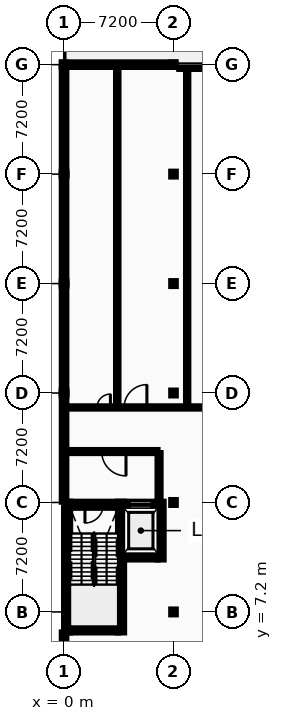
"""IFC4 building model, lengths in metres.
Left out: names, types, materials, properties, quantities, classifications, styles, units other than length and angle.
Written with IfcOpenShell. Run it as: python <this file> out.ifc"""

import sys

from ifc_helpers import new_model, si_unit, direction, frame, frame_2d, origin, origin_2d, place, context, subcontext, project, spatial, rectangle, i_section, extrude, element, fill, save


model = new_model("IFC4")
c1 = context("Model", 3, precision=1e-05, world=origin(), true_north=direction((0.0, 1.0)))
c2 = subcontext(c1, "Body", "Model", "MODEL_VIEW")
j1 = project(units=[si_unit("LENGTHUNIT", "METRE"), si_unit("PLANEANGLEUNIT", "RADIAN")], contexts=[c1])
p1 = place(None, origin())
s1 = spatial("IfcSite", under=j1, at=p1, CompositionType="ELEMENT")
p2 = place(p1, origin())
s2 = spatial("IfcBuilding", under=s1, at=p2, CompositionType="ELEMENT")
p3 = place(p2, frame((0.0, 0.0, 22.8)))
s3 = spatial("IfcBuildingStorey", under=s2, at=p3, CompositionType="ELEMENT", Elevation=22.8)
for number, where, z_axis, x_axis in (
    (1, (0.0, 21.6, 0.0), (0.0, 0.0, 1.0), (1.0, 0.0, 0.0)),
    (2, (0.0, 28.8, 0.0), (0.0, 0.0, 1.0), (1.0, 0.0, 0.0)),
    (3, (0.0, 36.0, 0.0), (0.0, 0.0, 1.0), (1.0, 0.0, 0.0)),
):
    element("IfcColumn", number, at=place(p3, frame(where, z_axis=z_axis, x_axis=x_axis)), inside=s3, PredefinedType="COLUMN", context=c2, shape_type="SweptSolid", body=[
        extrude(i_section(OverallWidth=0.3, OverallDepth=0.32, WebThickness=0.011, FlangeThickness=0.021, FilletRadius=0.027, at=origin_2d()), origin(), (0.0, 0.0, 1.0), 4.4),
    ])
p4 = place(p3, frame((0.0, 43.2, 0.0), z_axis=(0.0, 0.0, 1.0), x_axis=(1.0, 0.0, 0.0)))
e4 = element("IfcColumn", 4, at=p4, inside=s3, PredefinedType="COLUMN", context=c2, shape_type="SweptSolid", body=[
    extrude(i_section(OverallWidth=0.28, OverallDepth=0.28, WebThickness=0.01, FlangeThickness=0.018, FilletRadius=0.024, at=origin_2d()), origin(), (0.0, 0.0, 1.0), 4.4),
])
for number, where, z_axis, x_axis in (
    (5, (7.2, 7.2, 0.0), (0.0, 0.0, 1.0), (1.0, 0.0, 0.0)),
    (6, (7.2, 14.4, 0.0), (0.0, 0.0, 1.0), (1.0, 0.0, 0.0)),
    (7, (7.2, 21.6, 0.0), (0.0, 0.0, 1.0), (1.0, 0.0, 0.0)),
    (8, (7.2, 28.8, 0.0), (0.0, 0.0, 1.0), (1.0, 0.0, 0.0)),
    (9, (7.2, 36.0, 0.0), (0.0, 0.0, 1.0), (1.0, 0.0, 0.0)),
):
    element("IfcColumn", number, at=place(p3, frame(where, z_axis=z_axis, x_axis=x_axis)), inside=s3, PredefinedType="COLUMN", context=c2, shape_type="SweptSolid", body=[
        extrude(i_section(OverallWidth=0.3, OverallDepth=0.32, WebThickness=0.011, FlangeThickness=0.021, FilletRadius=0.027, at=origin_2d()), origin(), (0.0, 0.0, 1.0), 4.4),
    ])
p5 = place(p3, frame((7.2, 43.2, 0.0), z_axis=(0.0, 0.0, 1.0), x_axis=(1.0, 0.0, 0.0)))
e10 = element("IfcColumn", 10, at=p5, inside=s3, PredefinedType="COLUMN", context=c2, shape_type="SweptSolid", body=[
    extrude(i_section(OverallWidth=0.28, OverallDepth=0.28, WebThickness=0.01, FlangeThickness=0.018, FilletRadius=0.024, at=origin_2d()), origin(), (0.0, 0.0, 1.0), 4.4),
])
p6 = place(p3, frame((7.31, 43.2, 0.0), z_axis=(0.0, 0.0, 1.0), x_axis=(-1.0, 0.0, 0.0)))
e11 = element("IfcWall", 11, at=p6, inside=s3, PredefinedType="STANDARD", context=c2, shape_type="SweptSolid", body=[
    extrude(rectangle(XDim=7.46, YDim=0.3, at=frame_2d((3.73, 0.0))), origin(), (0.0, 0.0, 1.0), 3.915),
])
p7 = place(p3, frame((0.0, 5.85, 0.0), z_axis=(0.0, 0.0, 1.0), x_axis=(0.0, -1.0, 0.0)))
e12 = element("IfcWall", 12, at=p7, inside=s3, PredefinedType="STANDARD", context=c2, shape_type="SweptSolid", body=[
    extrude(rectangle(XDim=5.7, YDim=0.3, at=frame_2d((2.85, 0.0))), origin(), (0.0, 0.0, 1.0), 4.215),
])
p8 = place(p7, frame((1.95, 0.0, 0.9)))
e13 = element("IfcOpeningElement", 13, at=p8, cuts=e12, PredefinedType="OPENING", context=c2, shape_type="SweptSolid", body=[
    extrude(rectangle(XDim=1.8, YDim=1.8, at=frame_2d((0.9, 0.9))), frame((0.0, 0.16, 0.0), z_axis=(0.0, -1.0, 0.0), x_axis=(1.0, 0.0, 0.0)), (0.0, 0.0, 1.0), 0.32),
])
p9 = place(p3, frame((0.0, 21.6, 0.0), z_axis=(0.0, 0.0, 1.0), x_axis=(0.0, -1.0, 0.0)))
e14 = element("IfcWall", 14, at=p9, inside=s3, PredefinedType="STANDARD", context=c2, shape_type="SweptSolid", body=[
    extrude(rectangle(XDim=7.15, YDim=0.3, at=frame_2d((3.575, 0.0))), origin(), (0.0, 0.0, 1.0), 4.215),
])
p10 = place(p3, frame((0.0, 28.8, 0.0), z_axis=(0.0, 0.0, 1.0), x_axis=(0.0, -1.0, 0.0)))
e15 = element("IfcWall", 15, at=p10, inside=s3, PredefinedType="STANDARD", context=c2, shape_type="SweptSolid", body=[
    extrude(rectangle(XDim=7.2, YDim=0.3, at=frame_2d((3.6, 0.0))), origin(), (0.0, 0.0, 1.0), 3.9),
])
p11 = place(p10, frame((1.56, 0.0, 0.9)))
e16 = element("IfcOpeningElement", 16, at=p11, cuts=e15, PredefinedType="OPENING", context=c2, shape_type="SweptSolid", body=[
    extrude(rectangle(XDim=1.2, YDim=1.8, at=frame_2d((0.6, 0.9))), frame((0.0, 0.16, 0.0), z_axis=(0.0, -1.0, 0.0), x_axis=(1.0, 0.0, 0.0)), (0.0, 0.0, 1.0), 0.32),
])
p12 = place(p10, frame((4.44, 0.0, 0.9)))
e17 = element("IfcOpeningElement", 17, at=p12, cuts=e15, PredefinedType="OPENING", context=c2, shape_type="SweptSolid", body=[
    extrude(rectangle(XDim=1.2, YDim=1.8, at=frame_2d((0.6, 0.9))), frame((0.0, 0.16, 0.0), z_axis=(0.0, -1.0, 0.0), x_axis=(1.0, 0.0, 0.0)), (0.0, 0.0, 1.0), 0.32),
])
p13 = place(p3, frame((0.0, 36.0, 0.0), z_axis=(0.0, 0.0, 1.0), x_axis=(0.0, -1.0, 0.0)))
e18 = element("IfcWall", 18, at=p13, inside=s3, PredefinedType="STANDARD", context=c2, shape_type="SweptSolid", body=[
    extrude(rectangle(XDim=7.2, YDim=0.3, at=frame_2d((3.6, 0.0))), origin(), (0.0, 0.0, 1.0), 3.9),
])
p14 = place(p13, frame((1.71, 0.0, 1.1)))
e19 = element("IfcOpeningElement", 19, at=p14, cuts=e18, PredefinedType="OPENING", context=c2, shape_type="SweptSolid", body=[
    extrude(rectangle(XDim=0.9, YDim=1.6, at=frame_2d((0.45, 0.8))), frame((0.0, 0.16, 0.0), z_axis=(0.0, -1.0, 0.0), x_axis=(1.0, 0.0, 0.0)), (0.0, 0.0, 1.0), 0.32),
])
p15 = place(p13, frame((4.59, 0.0, 1.1)))
e20 = element("IfcOpeningElement", 20, at=p15, cuts=e18, PredefinedType="OPENING", context=c2, shape_type="SweptSolid", body=[
    extrude(rectangle(XDim=0.9, YDim=1.6, at=frame_2d((0.45, 0.8))), frame((0.0, 0.16, 0.0), z_axis=(0.0, -1.0, 0.0), x_axis=(1.0, 0.0, 0.0)), (0.0, 0.0, 1.0), 0.32),
])
p16 = place(p3, frame((0.0, 43.05, 0.0), z_axis=(0.0, 0.0, 1.0), x_axis=(0.0, -1.0, 0.0)))
e21 = element("IfcWall", 21, at=p16, inside=s3, PredefinedType="STANDARD", context=c2, shape_type="SweptSolid", body=[
    extrude(rectangle(XDim=7.05, YDim=0.3, at=frame_2d((3.525, 0.0))), origin(), (0.0, 0.0, 1.0), 3.865),
])
p17 = place(p16, frame((2.475, 0.0, 1.0)))
e22 = element("IfcOpeningElement", 22, at=p17, cuts=e21, PredefinedType="OPENING", context=c2, shape_type="SweptSolid", body=[
    extrude(rectangle(XDim=2.1, YDim=1.7, at=frame_2d((1.05, 0.85))), frame((0.0, 0.16, 0.0), z_axis=(0.0, -1.0, 0.0), x_axis=(1.0, 0.0, 0.0)), (0.0, 0.0, 1.0), 0.32),
])
p18 = place(p3, frame((0.4, 6.05, 0.0), z_axis=(0.0, 0.0, 1.0), x_axis=(1.0, 0.0, 0.0)))
e23 = element("IfcWall", 23, at=p18, inside=s3, PredefinedType="SHEAR", context=c2, shape_type="SweptSolid", body=[
    extrude(rectangle(XDim=3.15, YDim=0.4, at=frame_2d((1.575, 0.0))), origin(), (0.0, 0.0, 1.0), 4.215),
])
p19 = place(p3, frame((0.4, 14.25, 0.0), z_axis=(0.0, 0.0, 1.0), x_axis=(1.0, 0.0, 0.0)))
e24 = element("IfcWall", 24, at=p19, inside=s3, PredefinedType="SHEAR", context=c2, shape_type="SweptSolid", body=[
    extrude(rectangle(XDim=3.15, YDim=0.4, at=frame_2d((1.575, 0.0))), origin(), (0.0, 0.0, 1.0), 4.215),
])
p20 = place(p19, frame((0.975, 0.0, 0.0)))
e25 = element("IfcOpeningElement", 25, at=p20, cuts=e24, PredefinedType="OPENING", context=c2, shape_type="SweptSolid", body=[
    extrude(rectangle(XDim=1.2, YDim=2.15, at=frame_2d((0.6, 1.075))), frame((0.0, 0.21, 0.0), z_axis=(0.0, -1.0, 0.0), x_axis=(1.0, 0.0, 0.0)), (0.0, 0.0, 1.0), 0.42),
])
for number, where, z_axis, x_axis in (
    (26, (0.2, 5.85, 0.0), (0.0, 0.0, 1.0), (0.0, 1.0, 0.0)),
    (27, (3.75, 5.85, 0.0), (0.0, 0.0, 1.0), (0.0, 1.0, 0.0)),
):
    element("IfcWall", number, at=place(p3, frame(where, z_axis=z_axis, x_axis=x_axis)), inside=s3, PredefinedType="SHEAR", context=c2, shape_type="SweptSolid", body=[
        extrude(rectangle(XDim=8.6, YDim=0.4, at=frame_2d((4.3, 0.0))), origin(), (0.0, 0.0, 1.0), 4.215),
    ])
p21 = place(p3, frame((3.95, 10.85, 0.0), z_axis=(0.0, 0.0, 1.0), x_axis=(1.0, 0.0, 0.0)))
e28 = element("IfcWall", 28, at=p21, inside=s3, PredefinedType="SHEAR", context=c2, shape_type="SweptSolid", body=[
    extrude(rectangle(XDim=2.2, YDim=0.4, at=frame_2d((1.1, 0.0))), origin(), (0.0, 0.0, 1.0), 4.215),
])
p22 = place(p3, frame((3.95, 14.25, 0.0), z_axis=(0.0, 0.0, 1.0), x_axis=(1.0, 0.0, 0.0)))
e29 = element("IfcWall", 29, at=p22, inside=s3, PredefinedType="SHEAR", context=c2, shape_type="SweptSolid", body=[
    extrude(rectangle(XDim=2.2, YDim=0.4, at=frame_2d((1.1, 0.0))), origin(), (0.0, 0.0, 1.0), 4.215),
])
p23 = place(p22, frame((0.4, 0.0, 0.0)))
e30 = element("IfcOpeningElement", 30, at=p23, cuts=e29, PredefinedType="OPENING", context=c2, shape_type="SweptSolid", body=[
    extrude(rectangle(XDim=1.4, YDim=2.2, at=frame_2d((0.7, 1.1))), frame((0.0, 0.21, 0.0), z_axis=(0.0, -1.0, 0.0), x_axis=(1.0, 0.0, 0.0)), (0.0, 0.0, 1.0), 0.42),
])
p24 = place(p3, frame((6.35, 10.65, 0.0), z_axis=(0.0, 0.0, 1.0), x_axis=(0.0, 1.0, 0.0)))
e31 = element("IfcWall", 31, at=p24, inside=s3, PredefinedType="SHEAR", context=c2, shape_type="SweptSolid", body=[
    extrude(rectangle(XDim=3.8, YDim=0.4, at=frame_2d((1.9, 0.0))), origin(), (0.0, 0.0, 1.0), 4.215),
])
p25 = place(p3, frame((0.4, 17.75, 0.0), z_axis=(0.0, 0.0, 1.0), x_axis=(1.0, 0.0, 0.0)))
e32 = element("IfcWall", 32, at=p25, inside=s3, PredefinedType="PARTITIONING", context=c2, shape_type="SweptSolid", body=[
    extrude(rectangle(XDim=5.75, YDim=0.2, at=frame_2d((2.875, 0.0))), origin(), (0.0, 0.0, 1.0), 4.215),
])
p26 = place(p25, frame((2.075, 0.0, 0.0)))
e33 = element("IfcOpeningElement", 33, at=p26, cuts=e32, PredefinedType="OPENING", context=c2, shape_type="SweptSolid", body=[
    extrude(rectangle(XDim=1.6, YDim=2.2, at=frame_2d((0.8, 1.1))), frame((0.0, 0.11, 0.0), z_axis=(0.0, -1.0, 0.0), x_axis=(1.0, 0.0, 0.0)), (0.0, 0.0, 1.0), 0.22),
])
p27 = place(p3, frame((6.25, 14.45, 0.0), z_axis=(0.0, 0.0, 1.0), x_axis=(0.0, 1.0, 0.0)))
e34 = element("IfcWall", 34, at=p27, inside=s3, PredefinedType="PARTITIONING", context=c2, shape_type="SweptSolid", body=[
    extrude(rectangle(XDim=3.2, YDim=0.2, at=frame_2d((1.6, 0.0))), origin(), (0.0, 0.0, 1.0), 4.215),
])
p28 = place(p3, frame((0.2, 20.65, 0.0), z_axis=(0.0, 0.0, 1.0), x_axis=(1.0, 0.0, 0.0)))
e35 = element("IfcWall", 35, at=p28, inside=s3, PredefinedType="PARTITIONING", context=c2, shape_type="SweptSolid", body=[
    extrude(rectangle(XDim=13.9, YDim=0.15, at=frame_2d((6.95, 0.0))), origin(), (0.0, 0.0, 1.0), 4.215),
])
p29 = place(p28, frame((1.97, 0.0, 0.0)))
e36 = element("IfcOpeningElement", 36, at=p29, cuts=e35, PredefinedType="OPENING", context=c2, shape_type="SweptSolid", body=[
    extrude(rectangle(XDim=0.88, YDim=2.096, at=frame_2d((0.44, 1.048))), frame((0.0, 0.085, 0.0), z_axis=(0.0, -1.0, 0.0), x_axis=(1.0, 0.0, 0.0)), (0.0, 0.0, 1.0), 0.17),
])
p30 = place(p28, frame((3.75, 0.0, 0.0)))
e37 = element("IfcOpeningElement", 37, at=p30, cuts=e35, PredefinedType="OPENING", context=c2, shape_type="SweptSolid", body=[
    extrude(rectangle(XDim=1.5, YDim=2.2, at=frame_2d((0.75, 1.1))), frame((0.0, 0.085, 0.0), z_axis=(0.0, -1.0, 0.0), x_axis=(1.0, 0.0, 0.0)), (0.0, 0.0, 1.0), 0.17),
])
p31 = place(p28, frame((10.447, 0.0, 0.0)))
e38 = element("IfcOpeningElement", 38, at=p31, cuts=e35, PredefinedType="OPENING", context=c2, shape_type="SweptSolid", body=[
    extrude(rectangle(XDim=0.906, YDim=2.096, at=frame_2d((0.453, 1.048))), frame((0.0, 0.085, 0.0), z_axis=(0.0, -1.0, 0.0), x_axis=(1.0, 0.0, 0.0)), (0.0, 0.0, 1.0), 0.17),
])
p32 = place(p3, frame((7.58, 43.0, 0.0), z_axis=(0.0, 0.0, 1.0), x_axis=(1.0, 0.0, 0.0)))
e39 = element("IfcWall", 39, at=p32, inside=s3, PredefinedType="PARTITIONING", context=c2, shape_type="SweptSolid", body=[
    extrude(rectangle(XDim=6.44, YDim=0.16, at=frame_2d((3.22, 0.0))), origin(), (0.0, 0.0, 1.0), 3.915),
])
p33 = place(p3, frame((3.5, 20.725, 0.0), z_axis=(0.0, 0.0, 1.0), x_axis=(0.0, 1.0, 0.0)))
e40 = element("IfcWall", 40, at=p33, inside=s3, PredefinedType="PARTITIONING", context=c2, shape_type="SweptSolid", body=[
    extrude(rectangle(XDim=22.275, YDim=0.16, at=frame_2d((11.137, 0.0))), origin(), (0.0, 0.0, 1.0), 4.215),
])
p34 = place(p3, frame((8.1, 20.725, 0.0), z_axis=(0.0, 0.0, 1.0), x_axis=(0.0, 1.0, 0.0)))
e41 = element("IfcWall", 41, at=p34, inside=s3, PredefinedType="PARTITIONING", context=c2, shape_type="SweptSolid", body=[
    extrude(rectangle(XDim=22.195, YDim=0.15, at=frame_2d((11.097, 0.0))), origin(), (0.0, 0.0, 1.0), 4.215),
])
p35 = place(p11, origin())
e42 = element("IfcWindow", 42, at=p35, inside=s3, PartitioningType="SINGLE_PANEL", PredefinedType="WINDOW", context=c2, shape_type="SweptSolid", body=[
    extrude(rectangle(XDim=1.2, YDim=1.8, at=frame_2d((0.6, 0.9))), frame((0.0, 0.03, 0.0), z_axis=(0.0, -1.0, 0.0), x_axis=(1.0, 0.0, 0.0)), (0.0, 0.0, 1.0), 0.06),
])
fill(e16, e42)
p36 = place(p12, origin())
e43 = element("IfcWindow", 43, at=p36, inside=s3, PartitioningType="SINGLE_PANEL", PredefinedType="WINDOW", context=c2, shape_type="SweptSolid", body=[
    extrude(rectangle(XDim=1.2, YDim=1.8, at=frame_2d((0.6, 0.9))), frame((0.0, 0.03, 0.0), z_axis=(0.0, -1.0, 0.0), x_axis=(1.0, 0.0, 0.0)), (0.0, 0.0, 1.0), 0.06),
])
fill(e17, e43)
p37 = place(p14, origin())
e44 = element("IfcWindow", 44, at=p37, inside=s3, PartitioningType="SINGLE_PANEL", PredefinedType="WINDOW", context=c2, shape_type="SweptSolid", body=[
    extrude(rectangle(XDim=0.9, YDim=1.6, at=frame_2d((0.45, 0.8))), frame((0.0, 0.03, 0.0), z_axis=(0.0, -1.0, 0.0), x_axis=(1.0, 0.0, 0.0)), (0.0, 0.0, 1.0), 0.06),
])
fill(e19, e44)
p38 = place(p15, origin())
e45 = element("IfcWindow", 45, at=p38, inside=s3, PartitioningType="SINGLE_PANEL", PredefinedType="WINDOW", context=c2, shape_type="SweptSolid", body=[
    extrude(rectangle(XDim=0.9, YDim=1.6, at=frame_2d((0.45, 0.8))), frame((0.0, 0.03, 0.0), z_axis=(0.0, -1.0, 0.0), x_axis=(1.0, 0.0, 0.0)), (0.0, 0.0, 1.0), 0.06),
])
fill(e20, e45)
p39 = place(p17, origin())
e46 = element("IfcWindow", 46, at=p39, inside=s3, PartitioningType="SINGLE_PANEL", PredefinedType="WINDOW", context=c2, shape_type="SweptSolid", body=[
    extrude(rectangle(XDim=2.1, YDim=1.7, at=frame_2d((1.05, 0.85))), frame((0.0, 0.03, 0.0), z_axis=(0.0, -1.0, 0.0), x_axis=(1.0, 0.0, 0.0)), (0.0, 0.0, 1.0), 0.06),
])
fill(e22, e46)
p40 = place(p20, frame((1.2, 0.0, 0.0), z_axis=(0.0, 0.0, 1.0), x_axis=(-1.0, 0.0, 0.0)))
e47 = element("IfcDoor", 47, at=p40, inside=s3, OperationType="SINGLE_SWING_LEFT", PredefinedType="DOOR", context=c2, shape_type="SweptSolid", body=[
    extrude(rectangle(XDim=1.2, YDim=2.15, at=frame_2d((0.6, 1.075))), frame((0.0, 0.025, 0.0), z_axis=(0.0, -1.0, 0.0), x_axis=(1.0, 0.0, 0.0)), (0.0, 0.0, 1.0), 0.05),
])
fill(e25, e47)
p41 = place(p23, origin())
e48 = element("IfcDoor", 48, at=p41, inside=s3, OperationType="SLIDING_TO_LEFT", PredefinedType="DOOR", context=c2, shape_type="SweptSolid", body=[
    extrude(rectangle(XDim=1.4, YDim=2.2, at=frame_2d((0.7, 1.1))), frame((0.0, 0.025, 0.0), z_axis=(0.0, -1.0, 0.0), x_axis=(1.0, 0.0, 0.0)), (0.0, 0.0, 1.0), 0.05),
])
fill(e30, e48)
p42 = place(p26, origin())
e49 = element("IfcDoor", 49, at=p42, inside=s3, OperationType="DOUBLE_DOOR_SINGLE_SWING", PredefinedType="DOOR", context=c2, shape_type="SweptSolid", body=[
    extrude(rectangle(XDim=1.6, YDim=2.2, at=frame_2d((0.8, 1.1))), frame((0.0, 0.025, 0.0), z_axis=(0.0, -1.0, 0.0), x_axis=(1.0, 0.0, 0.0)), (0.0, 0.0, 1.0), 0.05),
])
fill(e33, e49)
p43 = place(p29, frame((0.88, 0.0, 0.0), z_axis=(0.0, 0.0, 1.0), x_axis=(-1.0, 0.0, 0.0)))
e50 = element("IfcDoor", 50, at=p43, inside=s3, OperationType="SINGLE_SWING_RIGHT", PredefinedType="DOOR", context=c2, shape_type="SweptSolid", body=[
    extrude(rectangle(XDim=0.88, YDim=2.096, at=frame_2d((0.44, 1.048))), frame((0.0, 0.025, 0.0), z_axis=(0.0, -1.0, 0.0), x_axis=(1.0, 0.0, 0.0)), (0.0, 0.0, 1.0), 0.05),
])
fill(e36, e50)
p44 = place(p30, frame((1.5, 0.0, 0.0), z_axis=(0.0, 0.0, 1.0), x_axis=(-1.0, 0.0, 0.0)))
e51 = element("IfcDoor", 51, at=p44, inside=s3, OperationType="DOUBLE_DOOR_SINGLE_SWING", PredefinedType="DOOR", context=c2, shape_type="SweptSolid", body=[
    extrude(rectangle(XDim=1.5, YDim=2.2, at=frame_2d((0.75, 1.1))), frame((0.0, 0.025, 0.0), z_axis=(0.0, -1.0, 0.0), x_axis=(1.0, 0.0, 0.0)), (0.0, 0.0, 1.0), 0.05),
])
fill(e37, e51)
save(model, sys.argv[1])
